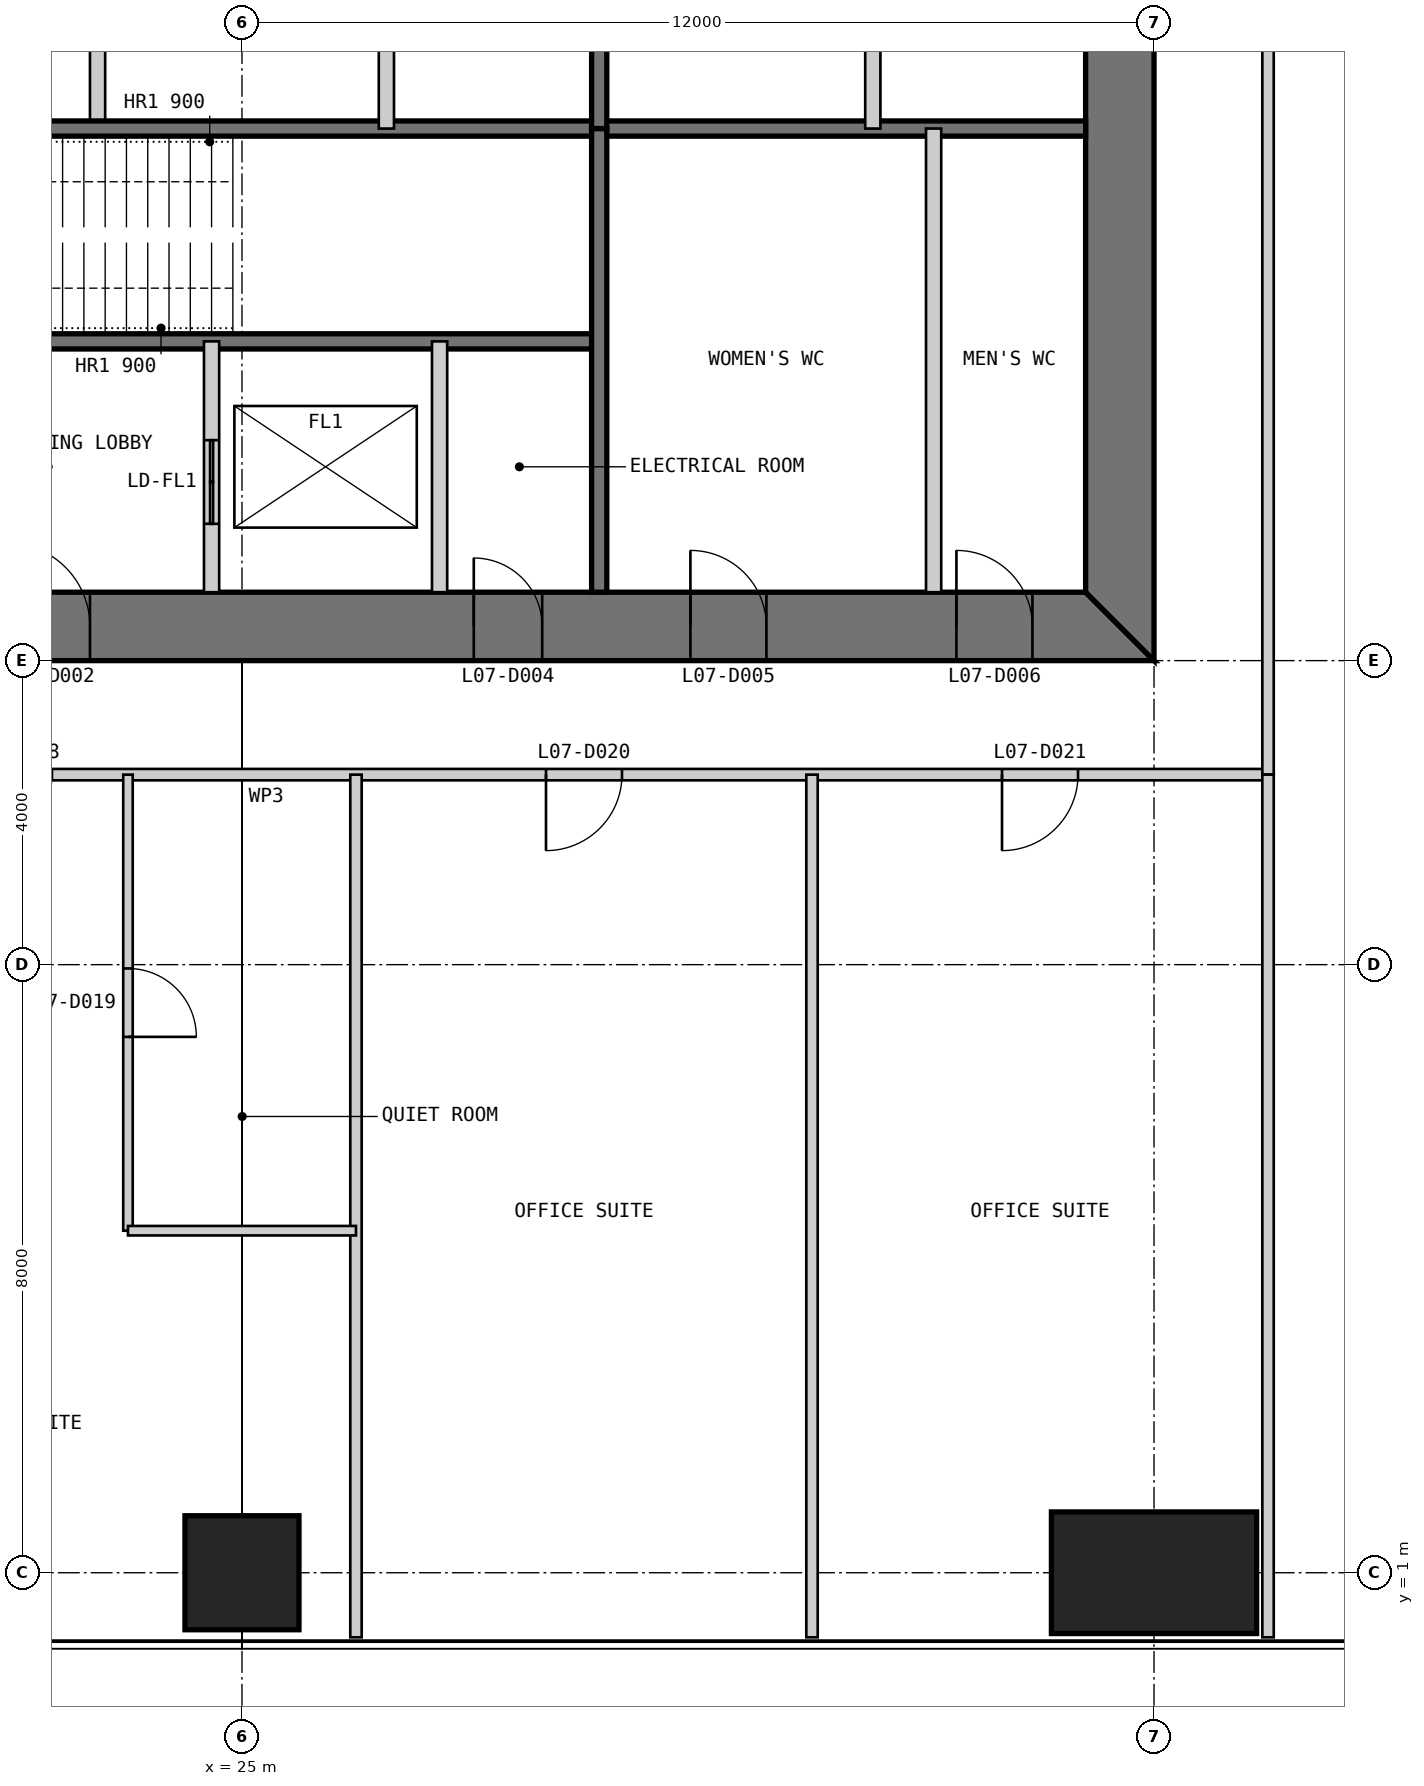
"""IFC4 building model, lengths in metres.
Left out: names, types, materials, properties, quantities, classifications, styles, units other than length and angle.
Written with IfcOpenShell. Run it as: python <this file> out.ifc"""

import sys

from ifc_helpers import new_model, si_unit, direction, frame, frame_2d, origin, origin_2d, place, context, subcontext, project, spatial, polyline, rectangle, outline, extrude, element, fill, save


model = new_model("IFC4")
c1 = context("Model", 3, precision=1e-05, world=origin(), true_north=direction((0.0, 1.0)))
c2 = subcontext(c1, "Body", "Model", "MODEL_VIEW")
j1 = project(units=[si_unit("LENGTHUNIT", "METRE"), si_unit("PLANEANGLEUNIT", "RADIAN")], contexts=[c1])
p1 = place(None, origin())
s1 = spatial("IfcSite", under=j1, at=p1, CompositionType="ELEMENT")
p2 = place(p1, origin())
s2 = spatial("IfcBuilding", under=s1, at=p2, CompositionType="ELEMENT")
p3 = place(p2, frame((0.0, 0.0, 35.0)))
s3 = spatial("IfcBuildingStorey", under=s2, at=p3, CompositionType="ELEMENT", Elevation=35.0)
p4 = place(p3, frame((25.0, 1.0, 0.0), z_axis=(0.0, 0.0, 1.0), x_axis=(1.0, 0.0, 0.0)))
e1 = element("IfcColumn", 1, at=p4, inside=s3, PredefinedType="COLUMN", context=c2, shape_type="SweptSolid", body=[
    extrude(rectangle(XDim=1.5, YDim=1.5, at=origin_2d()), origin(), (0.0, 0.0, 1.0), 4.0),
])
p5 = place(p3, frame((37.0, 1.0, 0.0), z_axis=(0.0, 0.0, 1.0), x_axis=(1.0, 0.0, 0.0)))
e2 = element("IfcColumn", 2, at=p5, inside=s3, PredefinedType="COLUMN", context=c2, shape_type="SweptSolid", body=[
    extrude(rectangle(XDim=2.7, YDim=1.6, at=origin_2d()), origin(), (0.0, 0.0, 1.0), 4.0),
])
p6 = place(p3, frame((13.0, 13.45, 0.0), z_axis=(0.0, 0.0, 1.0), x_axis=(1.0, 0.0, 0.0)))
e3 = element("IfcWall", 3, at=p6, inside=s3, PredefinedType="SHEAR", context=c2, shape_type="SweptSolid", body=[
    extrude(outline(polyline([(0.0, -0.45), (24.0, -0.45), (23.1, 0.45), (0.9, 0.45), (0.0, -0.45)])), origin(), (0.0, 0.0, 1.0), 4.0),
])
p7 = place(p6, frame((4.9, 0.0, 0.0)))
e4 = element("IfcOpeningElement", 4, at=p7, cuts=e3, PredefinedType="OPENING", context=c2, shape_type="SweptSolid", body=[
    extrude(rectangle(XDim=1.0, YDim=2.2, at=frame_2d((0.5, 1.1))), frame((0.0, 0.46, 0.0), z_axis=(0.0, -1.0, 0.0), x_axis=(1.0, 0.0, 0.0)), (0.0, 0.0, 1.0), 0.92),
])
p8 = place(p6, frame((8.9, 0.0, 0.0)))
e5 = element("IfcOpeningElement", 5, at=p8, cuts=e3, PredefinedType="OPENING", context=c2, shape_type="SweptSolid", body=[
    extrude(rectangle(XDim=1.1, YDim=2.2, at=frame_2d((0.55, 1.1))), frame((0.0, 0.46, 0.0), z_axis=(0.0, -1.0, 0.0), x_axis=(1.0, 0.0, 0.0)), (0.0, 0.0, 1.0), 0.92),
])
p9 = place(p6, frame((15.05, 0.0, 0.0)))
e6 = element("IfcOpeningElement", 6, at=p9, cuts=e3, PredefinedType="OPENING", context=c2, shape_type="SweptSolid", body=[
    extrude(rectangle(XDim=0.9, YDim=2.2, at=frame_2d((0.45, 1.1))), frame((0.0, 0.46, 0.0), z_axis=(0.0, -1.0, 0.0), x_axis=(1.0, 0.0, 0.0)), (0.0, 0.0, 1.0), 0.92),
])
p10 = place(p6, frame((17.9, 0.0, 0.0)))
e7 = element("IfcOpeningElement", 7, at=p10, cuts=e3, PredefinedType="OPENING", context=c2, shape_type="SweptSolid", body=[
    extrude(rectangle(XDim=1.0, YDim=2.2, at=frame_2d((0.5, 1.1))), frame((0.0, 0.46, 0.0), z_axis=(0.0, -1.0, 0.0), x_axis=(1.0, 0.0, 0.0)), (0.0, 0.0, 1.0), 0.92),
])
p11 = place(p6, frame((21.4, 0.0, 0.0)))
e8 = element("IfcOpeningElement", 8, at=p11, cuts=e3, PredefinedType="OPENING", context=c2, shape_type="SweptSolid", body=[
    extrude(rectangle(XDim=1.0, YDim=2.2, at=frame_2d((0.5, 1.1))), frame((0.0, 0.46, 0.0), z_axis=(0.0, -1.0, 0.0), x_axis=(1.0, 0.0, 0.0)), (0.0, 0.0, 1.0), 0.92),
])
p12 = place(p3, frame((36.55, 13.9, 0.0), z_axis=(0.0, 0.0, 1.0), x_axis=(0.0, 1.0, 0.0)))
e9 = element("IfcWall", 9, at=p12, inside=s3, PredefinedType="SHEAR", context=c2, shape_type="SweptSolid", body=[
    extrude(outline(polyline([(-0.9, -0.45), (23.1, -0.45), (22.2, 0.45), (0.0, 0.45), (-0.9, -0.45)])), origin(), (0.0, 0.0, 1.0), 4.0),
])
p13 = place(p12, frame((20.2, 0.0, 0.0)))
e10 = element("IfcOpeningElement", 10, at=p13, cuts=e9, PredefinedType="OPENING", context=c2, shape_type="SweptSolid", body=[
    extrude(rectangle(XDim=1.0, YDim=2.2, at=frame_2d((0.5, 1.1))), frame((0.0, 0.46, 0.0), z_axis=(0.0, -1.0, 0.0), x_axis=(1.0, 0.0, 0.0)), (0.0, 0.0, 1.0), 0.92),
])
p14 = place(p12, frame((17.25, 0.0, 0.0)))
e11 = element("IfcOpeningElement", 11, at=p14, cuts=e9, PredefinedType="OPENING", context=c2, shape_type="SweptSolid", body=[
    extrude(rectangle(XDim=0.9, YDim=2.2, at=frame_2d((0.45, 1.1))), frame((0.0, 0.46, 0.0), z_axis=(0.0, -1.0, 0.0), x_axis=(1.0, 0.0, 0.0)), (0.0, 0.0, 1.0), 0.92),
])
p15 = place(p3, frame((23.1, 20.0, 0.0), z_axis=(0.0, 0.0, 1.0), x_axis=(0.0, 1.0, 0.0)))
e12 = element("IfcWall", 12, at=p15, inside=s3, PredefinedType="PARTITIONING", context=c2, shape_type="SweptSolid", body=[
    extrude(rectangle(XDim=10.0, YDim=0.2, at=frame_2d((5.0, 0.0))), origin(), (0.0, 0.0, 1.0), 3.8),
])
p16 = place(p3, frame((20.3, 17.2, 0.0), z_axis=(0.0, 0.0, 1.0), x_axis=(1.0, 0.0, 0.0)))
e13 = element("IfcWall", 13, at=p16, inside=s3, PredefinedType="SOLIDWALL", context=c2, shape_type="SweptSolid", body=[
    extrude(rectangle(XDim=9.4, YDim=0.2, at=frame_2d((4.7, 0.0))), origin(), (0.0, 0.0, 1.0), 3.8),
])
p17 = place(p16, frame((0.25, 0.0, 0.0)))
e14 = element("IfcOpeningElement", 14, at=p17, cuts=e13, PredefinedType="OPENING", context=c2, shape_type="SweptSolid", body=[
    extrude(rectangle(XDim=1.0, YDim=2.2, at=frame_2d((0.5, 1.1))), frame((0.0, 0.11, 0.0), z_axis=(0.0, -1.0, 0.0), x_axis=(1.0, 0.0, 0.0)), (0.0, 0.0, 1.0), 0.22),
])
p18 = place(p3, frame((20.3, 20.0, 0.0), z_axis=(0.0, 0.0, 1.0), x_axis=(1.0, 0.0, 0.0)))
e15 = element("IfcWall", 15, at=p18, inside=s3, PredefinedType="SOLIDWALL", context=c2, shape_type="SweptSolid", body=[
    extrude(rectangle(XDim=15.8, YDim=0.2, at=frame_2d((7.9, 0.0))), origin(), (0.0, 0.0, 1.0), 3.8),
])
p19 = place(p3, frame((24.6, 13.9, 0.0), z_axis=(0.0, 0.0, 1.0), x_axis=(0.0, 1.0, 0.0)))
e16 = element("IfcWall", 16, at=p19, inside=s3, PredefinedType="PARTITIONING", context=c2, shape_type="SweptSolid", body=[
    extrude(rectangle(XDim=3.3, YDim=0.2, at=frame_2d((1.65, 0.0))), origin(), (0.0, 0.0, 1.0), 3.8),
])
p20 = place(p19, frame((0.9, 0.0, 0.0)))
e17 = element("IfcOpeningElement", 17, at=p20, cuts=e16, PredefinedType="OPENING", context=c2, shape_type="SweptSolid", body=[
    extrude(rectangle(XDim=1.1, YDim=2.2, at=frame_2d((0.55, 1.1))), frame((0.0, 0.11, 0.0), z_axis=(0.0, -1.0, 0.0), x_axis=(1.0, 0.0, 0.0)), (0.0, 0.0, 1.0), 0.22),
])
p21 = place(p3, frame((27.6, 13.9, 0.0), z_axis=(0.0, 0.0, 1.0), x_axis=(0.0, 1.0, 0.0)))
e18 = element("IfcWall", 18, at=p21, inside=s3, PredefinedType="PARTITIONING", context=c2, shape_type="SweptSolid", body=[
    extrude(rectangle(XDim=3.3, YDim=0.2, at=frame_2d((1.65, 0.0))), origin(), (0.0, 0.0, 1.0), 3.8),
])
p22 = place(p3, frame((29.7, 13.9, 0.0), z_axis=(0.0, 0.0, 1.0), x_axis=(0.0, 1.0, 0.0)))
e19 = element("IfcWall", 19, at=p22, inside=s3, PredefinedType="SOLIDWALL", context=c2, shape_type="SweptSolid", body=[
    extrude(rectangle(XDim=6.1, YDim=0.2, at=frame_2d((3.05, 0.0))), origin(), (0.0, 0.0, 1.0), 3.8),
])
p23 = place(p3, frame((34.1, 13.9, 0.0), z_axis=(0.0, 0.0, 1.0), x_axis=(0.0, 1.0, 0.0)))
e20 = element("IfcWall", 20, at=p23, inside=s3, PredefinedType="PARTITIONING", context=c2, shape_type="SweptSolid", body=[
    extrude(rectangle(XDim=6.1, YDim=0.2, at=frame_2d((3.05, 0.0))), origin(), (0.0, 0.0, 1.0), 3.8),
])
p24 = place(p3, frame((33.3, 36.1, 0.0), z_axis=(0.0, 0.0, 1.0), x_axis=(0.0, -1.0, 0.0)))
e21 = element("IfcWall", 21, at=p24, inside=s3, PredefinedType="PARTITIONING", context=c2, shape_type="SweptSolid", body=[
    extrude(rectangle(XDim=16.1, YDim=0.2, at=frame_2d((8.05, 0.0))), origin(), (0.0, 0.0, 1.0), 3.8),
])
p25 = place(p3, frame((29.7, 36.1, 0.0), z_axis=(0.0, 0.0, 1.0), x_axis=(0.0, -1.0, 0.0)))
e22 = element("IfcWall", 22, at=p25, inside=s3, PredefinedType="SOLIDWALL", context=c2, shape_type="SweptSolid", body=[
    extrude(rectangle(XDim=16.1, YDim=0.2, at=frame_2d((8.05, 0.0))), origin(), (0.0, 0.0, 1.0), 3.8),
])
p26 = place(p3, frame((26.9, 30.0, 0.0), z_axis=(0.0, 0.0, 1.0), x_axis=(0.0, -1.0, 0.0)))
e23 = element("IfcWall", 23, at=p26, inside=s3, PredefinedType="PARTITIONING", context=c2, shape_type="SweptSolid", body=[
    extrude(rectangle(XDim=10.0, YDim=0.2, at=frame_2d((5.0, 0.0))), origin(), (0.0, 0.0, 1.0), 3.8),
])
p27 = place(p3, frame((11.5, 11.5, 0.0), z_axis=(0.0, 0.0, 1.0), x_axis=(1.0, 0.0, 0.0)))
e24 = element("IfcWall", 24, at=p27, inside=s3, PredefinedType="PARTITIONING", context=c2, shape_type="SweptSolid", body=[
    extrude(rectangle(XDim=27.0, YDim=0.15, at=frame_2d((13.5, 0.0))), origin(), (0.0, 0.0, 1.0), 3.85),
])
p28 = place(p27, frame((4.0, 0.0, 0.0)))
e25 = element("IfcOpeningElement", 25, at=p28, cuts=e24, PredefinedType="OPENING", context=c2, shape_type="SweptSolid", body=[
    extrude(rectangle(XDim=1.0, YDim=2.2, at=frame_2d((0.5, 1.1))), frame((0.0, 0.085, 0.0), z_axis=(0.0, -1.0, 0.0), x_axis=(1.0, 0.0, 0.0)), (0.0, 0.0, 1.0), 0.17),
])
p29 = place(p27, frame((10.0, 0.0, 0.0)))
e26 = element("IfcOpeningElement", 26, at=p29, cuts=e24, PredefinedType="OPENING", context=c2, shape_type="SweptSolid", body=[
    extrude(rectangle(XDim=1.0, YDim=2.2, at=frame_2d((0.5, 1.1))), frame((0.0, 0.085, 0.0), z_axis=(0.0, -1.0, 0.0), x_axis=(1.0, 0.0, 0.0)), (0.0, 0.0, 1.0), 0.17),
])
p30 = place(p27, frame((17.5, 0.0, 0.0)))
e27 = element("IfcOpeningElement", 27, at=p30, cuts=e24, PredefinedType="OPENING", context=c2, shape_type="SweptSolid", body=[
    extrude(rectangle(XDim=1.0, YDim=2.2, at=frame_2d((0.5, 1.1))), frame((0.0, 0.085, 0.0), z_axis=(0.0, -1.0, 0.0), x_axis=(1.0, 0.0, 0.0)), (0.0, 0.0, 1.0), 0.17),
])
p31 = place(p27, frame((23.5, 0.0, 0.0)))
e28 = element("IfcOpeningElement", 28, at=p31, cuts=e24, PredefinedType="OPENING", context=c2, shape_type="SweptSolid", body=[
    extrude(rectangle(XDim=1.0, YDim=2.2, at=frame_2d((0.5, 1.1))), frame((0.0, 0.085, 0.0), z_axis=(0.0, -1.0, 0.0), x_axis=(1.0, 0.0, 0.0)), (0.0, 0.0, 1.0), 0.17),
])
p32 = place(p3, frame((23.5, 5.5, 0.0), z_axis=(0.0, 0.0, 1.0), x_axis=(0.0, 1.0, 0.0)))
e29 = element("IfcWall", 29, at=p32, inside=s3, PredefinedType="PARTITIONING", context=c2, shape_type="SweptSolid", body=[
    extrude(rectangle(XDim=6.0, YDim=0.125, at=frame_2d((3.0, 0.0))), origin(), (0.0, 0.0, 1.0), 3.85),
])
p33 = place(p32, frame((2.55, 0.0, 0.0)))
e30 = element("IfcOpeningElement", 30, at=p33, cuts=e29, PredefinedType="OPENING", context=c2, shape_type="SweptSolid", body=[
    extrude(rectangle(XDim=0.9, YDim=2.2, at=frame_2d((0.45, 1.1))), frame((0.0, 0.073, 0.0), z_axis=(0.0, -1.0, 0.0), x_axis=(1.0, 0.0, 0.0)), (0.0, 0.0, 1.0), 0.145),
])
for number, where, z_axis, x_axis in (
    (31, (26.5, 0.15, 0.0), (0.0, 0.0, 1.0), (0.0, 1.0, 0.0)),
    (32, (32.5, 0.15, 0.0), (0.0, 0.0, 1.0), (0.0, 1.0, 0.0)),
):
    element("IfcWall", number, at=place(p3, frame(where, z_axis=z_axis, x_axis=x_axis)), inside=s3, PredefinedType="PARTITIONING", context=c2, shape_type="SweptSolid", body=[
        extrude(rectangle(XDim=11.35, YDim=0.15, at=frame_2d((5.675, 0.0))), origin(), (0.0, 0.0, 1.0), 3.85),
    ])
p34 = place(p3, frame((23.5, 5.5, 0.0), z_axis=(0.0, 0.0, 1.0), x_axis=(1.0, 0.0, 0.0)))
e33 = element("IfcWall", 33, at=p34, inside=s3, PredefinedType="PARTITIONING", context=c2, shape_type="SweptSolid", body=[
    extrude(rectangle(XDim=3.0, YDim=0.125, at=frame_2d((1.5, 0.0))), origin(), (0.0, 0.0, 1.0), 3.85),
])
p35 = place(p3, frame((38.5, 11.5, 0.0), z_axis=(0.0, 0.0, 1.0), x_axis=(0.0, 1.0, 0.0)))
e34 = element("IfcWall", 34, at=p35, inside=s3, PredefinedType="PARTITIONING", context=c2, shape_type="SweptSolid", body=[
    extrude(rectangle(XDim=27.0, YDim=0.15, at=frame_2d((13.5, 0.0))), origin(), (0.0, 0.0, 1.0), 3.85),
])
p36 = place(p35, frame((11.5, 0.0, 0.0)))
e35 = element("IfcOpeningElement", 35, at=p36, cuts=e34, PredefinedType="OPENING", context=c2, shape_type="SweptSolid", body=[
    extrude(rectangle(XDim=1.0, YDim=2.2, at=frame_2d((0.5, 1.1))), frame((0.0, 0.085, 0.0), z_axis=(0.0, -1.0, 0.0), x_axis=(1.0, 0.0, 0.0)), (0.0, 0.0, 1.0), 0.17),
])
p37 = place(p3, frame((38.5, 0.15, 0.0), z_axis=(0.0, 0.0, 1.0), x_axis=(0.0, 1.0, 0.0)))
e36 = element("IfcWall", 36, at=p37, inside=s3, PredefinedType="PARTITIONING", context=c2, shape_type="SweptSolid", body=[
    extrude(rectangle(XDim=11.35, YDim=0.15, at=frame_2d((5.675, 0.0))), origin(), (0.0, 0.0, 1.0), 3.85),
])
p38 = place(p8, origin())
e37 = element("IfcDoor", 37, at=p38, inside=s3, OperationType="SINGLE_SWING_LEFT", PredefinedType="DOOR", context=c2, shape_type="SweptSolid", body=[
    extrude(rectangle(XDim=1.1, YDim=2.2, at=frame_2d((0.55, 1.1))), frame((0.0, 0.025, 0.0), z_axis=(0.0, -1.0, 0.0), x_axis=(1.0, 0.0, 0.0)), (0.0, 0.0, 1.0), 0.05),
    extrude(outline(polyline([(0.0, 0.0), (0.04, 0.0), (0.04, 2.16), (1.06, 2.16), (1.06, 0.0), (1.1, 0.0), (1.1, 2.2), (0.0, 2.2), (0.0, 0.0)])), frame((0.0, 0.3, 0.0), z_axis=(0.0, -1.0, 0.0), x_axis=(1.0, 0.0, 0.0)), (0.0, 0.0, 1.0), 0.6),
])
fill(e5, e37)
p39 = place(p9, origin())
e38 = element("IfcDoor", 38, at=p39, inside=s3, OperationType="SINGLE_SWING_LEFT", PredefinedType="DOOR", context=c2, shape_type="SweptSolid", body=[
    extrude(rectangle(XDim=0.9, YDim=2.2, at=frame_2d((0.45, 1.1))), frame((0.0, 0.025, 0.0), z_axis=(0.0, -1.0, 0.0), x_axis=(1.0, 0.0, 0.0)), (0.0, 0.0, 1.0), 0.05),
    extrude(outline(polyline([(0.0, 0.0), (0.04, 0.0), (0.04, 2.16), (0.86, 2.16), (0.86, 0.0), (0.9, 0.0), (0.9, 2.2), (0.0, 2.2), (0.0, 0.0)])), frame((0.0, 0.3, 0.0), z_axis=(0.0, -1.0, 0.0), x_axis=(1.0, 0.0, 0.0)), (0.0, 0.0, 1.0), 0.6),
])
fill(e6, e38)
p40 = place(p10, origin())
e39 = element("IfcDoor", 39, at=p40, inside=s3, OperationType="SINGLE_SWING_LEFT", PredefinedType="DOOR", context=c2, shape_type="SweptSolid", body=[
    extrude(rectangle(XDim=1.0, YDim=2.2, at=frame_2d((0.5, 1.1))), frame((0.0, 0.025, 0.0), z_axis=(0.0, -1.0, 0.0), x_axis=(1.0, 0.0, 0.0)), (0.0, 0.0, 1.0), 0.05),
    extrude(outline(polyline([(0.0, 0.0), (0.04, 0.0), (0.04, 2.16), (0.96, 2.16), (0.96, 0.0), (1.0, 0.0), (1.0, 2.2), (0.0, 2.2), (0.0, 0.0)])), frame((0.0, 0.3, 0.0), z_axis=(0.0, -1.0, 0.0), x_axis=(1.0, 0.0, 0.0)), (0.0, 0.0, 1.0), 0.6),
])
fill(e7, e39)
p41 = place(p11, origin())
e40 = element("IfcDoor", 40, at=p41, inside=s3, OperationType="SINGLE_SWING_LEFT", PredefinedType="DOOR", context=c2, shape_type="SweptSolid", body=[
    extrude(rectangle(XDim=1.0, YDim=2.2, at=frame_2d((0.5, 1.1))), frame((0.0, 0.025, 0.0), z_axis=(0.0, -1.0, 0.0), x_axis=(1.0, 0.0, 0.0)), (0.0, 0.0, 1.0), 0.05),
    extrude(outline(polyline([(0.0, 0.0), (0.04, 0.0), (0.04, 2.16), (0.96, 2.16), (0.96, 0.0), (1.0, 0.0), (1.0, 2.2), (0.0, 2.2), (0.0, 0.0)])), frame((0.0, 0.3, 0.0), z_axis=(0.0, -1.0, 0.0), x_axis=(1.0, 0.0, 0.0)), (0.0, 0.0, 1.0), 0.6),
])
fill(e8, e40)
p42 = place(p33, frame((0.9, 0.0, 0.0), z_axis=(0.0, 0.0, 1.0), x_axis=(-1.0, 0.0, 0.0)))
e41 = element("IfcDoor", 41, at=p42, inside=s3, OperationType="SINGLE_SWING_RIGHT", PredefinedType="DOOR", context=c2, shape_type="SweptSolid", body=[
    extrude(rectangle(XDim=0.9, YDim=2.2, at=frame_2d((0.45, 1.1))), frame((0.0, 0.025, 0.0), z_axis=(0.0, -1.0, 0.0), x_axis=(1.0, 0.0, 0.0)), (0.0, 0.0, 1.0), 0.05),
])
fill(e30, e41)
p43 = place(p30, frame((1.0, 0.0, 0.0), z_axis=(0.0, 0.0, 1.0), x_axis=(-1.0, 0.0, 0.0)))
e42 = element("IfcDoor", 42, at=p43, inside=s3, OperationType="SINGLE_SWING_RIGHT", PredefinedType="DOOR", context=c2, shape_type="SweptSolid", body=[
    extrude(rectangle(XDim=1.0, YDim=2.2, at=frame_2d((0.5, 1.1))), frame((0.0, 0.025, 0.0), z_axis=(0.0, -1.0, 0.0), x_axis=(1.0, 0.0, 0.0)), (0.0, 0.0, 1.0), 0.05),
])
fill(e27, e42)
p44 = place(p31, frame((1.0, 0.0, 0.0), z_axis=(0.0, 0.0, 1.0), x_axis=(-1.0, 0.0, 0.0)))
e43 = element("IfcDoor", 43, at=p44, inside=s3, OperationType="SINGLE_SWING_RIGHT", PredefinedType="DOOR", context=c2, shape_type="SweptSolid", body=[
    extrude(rectangle(XDim=1.0, YDim=2.2, at=frame_2d((0.5, 1.1))), frame((0.0, 0.025, 0.0), z_axis=(0.0, -1.0, 0.0), x_axis=(1.0, 0.0, 0.0)), (0.0, 0.0, 1.0), 0.05),
])
fill(e28, e43)
p45 = place(p20, origin())
e44 = element("IfcDoor", 44, at=p45, inside=s3, OperationType="DOUBLE_DOOR_SLIDING", PredefinedType="DOOR", context=c2, shape_type="SweptSolid", body=[
    extrude(rectangle(XDim=1.1, YDim=2.2, at=frame_2d((0.55, 1.1))), frame((0.0, 0.025, 0.0), z_axis=(0.0, -1.0, 0.0), x_axis=(1.0, 0.0, 0.0)), (0.0, 0.0, 1.0), 0.05),
])
fill(e17, e44)
save(model, sys.argv[1])
